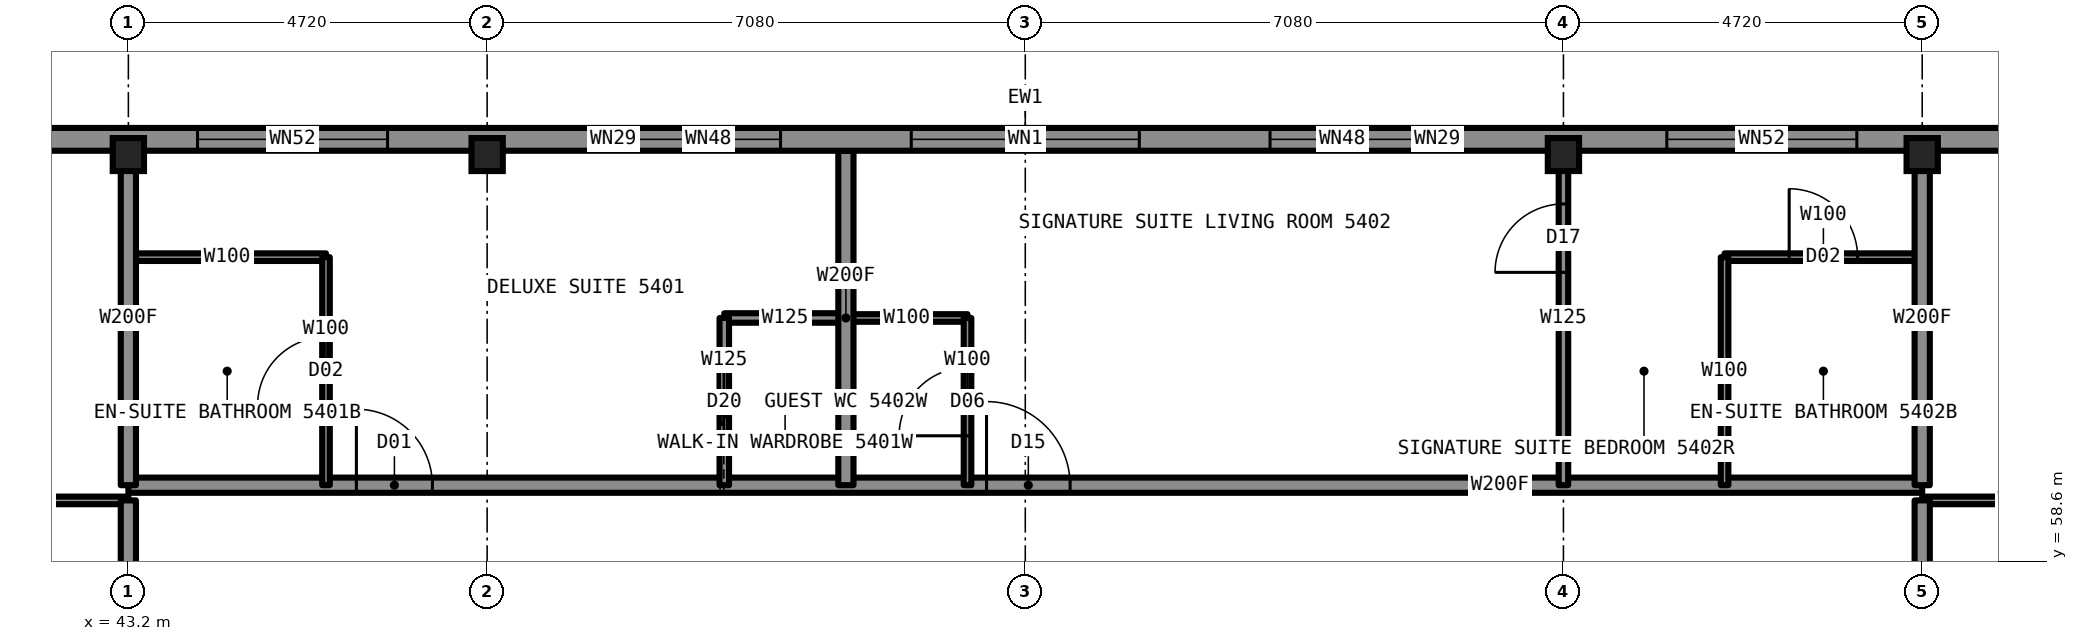
"""IFC4 building model, lengths in metres.
Left out: names, types, materials, properties, quantities, classifications, styles, units other than length and angle.
Written with IfcOpenShell. Run it as: python <this file> out.ifc"""

import sys

from ifc_helpers import new_model, si_unit, direction, frame, frame_2d, origin, origin_2d, place, context, subcontext, project, spatial, rectangle, i_section, extrude, element, fill, save


model = new_model("IFC4")
c1 = context("Model", 3, precision=1e-05, world=origin(), true_north=direction((0.0, 1.0)))
c2 = subcontext(c1, "Body", "Model", "MODEL_VIEW")
j1 = project(units=[si_unit("LENGTHUNIT", "METRE"), si_unit("PLANEANGLEUNIT", "RADIAN")], contexts=[c1])
p1 = place(None, origin())
s1 = spatial("IfcSite", under=j1, at=p1, CompositionType="ELEMENT")
p2 = place(p1, origin())
s2 = spatial("IfcBuilding", under=s1, at=p2, CompositionType="ELEMENT")
p3 = place(p2, frame((0.0, 0.0, 193.3)))
s3 = spatial("IfcBuildingStorey", under=s2, at=p3, CompositionType="ELEMENT", Elevation=193.3)
for number, where, z_axis, x_axis in (
    (1, (43.2, 63.95, 0.0), (0.0, 0.0, 1.0), (1.0, 0.0, 0.0)),
    (2, (47.92, 63.95, 0.0), (0.0, 0.0, 1.0), (1.0, 0.0, 0.0)),
    (3, (62.08, 63.95, 0.0), (0.0, 0.0, 1.0), (1.0, 0.0, 0.0)),
    (4, (66.8, 63.95, 0.0), (0.0, 0.0, 1.0), (1.0, 0.0, 0.0)),
):
    element("IfcColumn", number, at=place(p3, frame(where, z_axis=z_axis, x_axis=x_axis)), inside=s3, PredefinedType="COLUMN", context=c2, shape_type="SweptSolid", body=[
        extrude(i_section(OverallWidth=0.411, OverallDepth=0.434, WebThickness=0.036, FlangeThickness=0.057, at=origin_2d()), origin(), (0.0, 0.0, 1.0), 3.5),
    ])
for number, where, z_axis, x_axis in (
    (5, (40.6, 59.4, 0.0), (0.0, 0.0, 1.0), (1.0, 0.0, 0.0)),
    (6, (66.8, 59.4, 0.0), (0.0, 0.0, 1.0), (1.0, 0.0, 0.0)),
):
    element("IfcWall", number, at=place(p3, frame(where, z_axis=z_axis, x_axis=x_axis)), inside=s3, PredefinedType="PARTITIONING", context=c2, shape_type="SweptSolid", body=[
        extrude(rectangle(XDim=2.6, YDim=0.1, at=frame_2d((1.3, 0.0))), origin(), (0.0, 0.0, 1.0), 3.33),
    ])
p4 = place(p3, frame((43.2, 59.6, 0.0), z_axis=(0.0, 0.0, 1.0), x_axis=(1.0, 0.0, 0.0)))
e7 = element("IfcWall", 7, at=p4, inside=s3, PredefinedType="PARTITIONING", context=c2, shape_type="SweptSolid", body=[
    extrude(rectangle(XDim=23.6, YDim=0.2, at=frame_2d((11.8, 0.0))), origin(), (0.0, 0.0, 1.0), 3.33),
])
p5 = place(p4, frame((3.0, 0.0, 0.0)))
e8 = element("IfcOpeningElement", 8, at=p5, cuts=e7, PredefinedType="OPENING", context=c2, shape_type="SweptSolid", body=[
    extrude(rectangle(XDim=1.0, YDim=2.2, at=frame_2d((0.5, 1.1))), frame((0.0, 0.11, 0.0), z_axis=(0.0, -1.0, 0.0), x_axis=(1.0, 0.0, 0.0)), (0.0, 0.0, 1.0), 0.22),
])
p6 = place(p4, frame((11.29, 0.0, 0.0)))
e9 = element("IfcOpeningElement", 9, at=p6, cuts=e7, PredefinedType="OPENING", context=c2, shape_type="SweptSolid", body=[
    extrude(rectangle(XDim=1.1, YDim=2.2, at=frame_2d((0.55, 1.1))), frame((0.0, 0.11, 0.0), z_axis=(0.0, -1.0, 0.0), x_axis=(1.0, 0.0, 0.0)), (0.0, 0.0, 1.0), 0.22),
])
p7 = place(p3, frame((52.64, 61.8, 0.0), z_axis=(0.0, 0.0, 1.0), x_axis=(1.0, 0.0, 0.0)))
e10 = element("IfcWall", 10, at=p7, inside=s3, PredefinedType="PARTITIONING", context=c2, shape_type="SweptSolid", body=[
    extrude(rectangle(XDim=1.6, YDim=0.1, at=frame_2d((0.8, 0.0))), origin(), (0.0, 0.0, 1.0), 3.33),
])
p8 = place(p3, frame((51.04, 61.8, 0.0), z_axis=(0.0, 0.0, 1.0), x_axis=(1.0, 0.0, 0.0)))
e11 = element("IfcWall", 11, at=p8, inside=s3, PredefinedType="PARTITIONING", context=c2, shape_type="SweptSolid", body=[
    extrude(rectangle(XDim=1.6, YDim=0.125, at=frame_2d((0.8, 0.0))), origin(), (0.0, 0.0, 1.0), 3.33),
])
p9 = place(p3, frame((43.2, 62.6, 0.0), z_axis=(0.0, 0.0, 1.0), x_axis=(1.0, 0.0, 0.0)))
e12 = element("IfcWall", 12, at=p9, inside=s3, PredefinedType="PARTITIONING", context=c2, shape_type="SweptSolid", body=[
    extrude(rectangle(XDim=2.6, YDim=0.1, at=frame_2d((1.3, 0.0))), origin(), (0.0, 0.0, 1.0), 3.33),
])
p10 = place(p3, frame((64.2, 62.6, 0.0), z_axis=(0.0, 0.0, 1.0), x_axis=(1.0, 0.0, 0.0)))
e13 = element("IfcWall", 13, at=p10, inside=s3, PredefinedType="PARTITIONING", context=c2, shape_type="SweptSolid", body=[
    extrude(rectangle(XDim=2.6, YDim=0.1, at=frame_2d((1.3, 0.0))), origin(), (0.0, 0.0, 1.0), 3.33),
])
p11 = place(p10, frame((0.85, 0.0, 0.0)))
e14 = element("IfcOpeningElement", 14, at=p11, cuts=e13, PredefinedType="OPENING", context=c2, shape_type="SweptSolid", body=[
    extrude(rectangle(XDim=0.9, YDim=2.1, at=frame_2d((0.45, 1.05))), frame((0.0, 0.06, 0.0), z_axis=(0.0, -1.0, 0.0), x_axis=(1.0, 0.0, 0.0)), (0.0, 0.0, 1.0), 0.12),
])
p12 = place(p3, frame((54.24, 59.6, 0.0), z_axis=(0.0, 0.0, 1.0), x_axis=(0.0, 1.0, 0.0)))
e15 = element("IfcWall", 15, at=p12, inside=s3, PredefinedType="PARTITIONING", context=c2, shape_type="SweptSolid", body=[
    extrude(rectangle(XDim=2.2, YDim=0.1, at=frame_2d((1.1, 0.0))), origin(), (0.0, 0.0, 1.0), 3.33),
])
p13 = place(p12, frame((0.65, 0.0, 0.0)))
e16 = element("IfcOpeningElement", 16, at=p13, cuts=e15, PredefinedType="OPENING", context=c2, shape_type="SweptSolid", body=[
    extrude(rectangle(XDim=0.9, YDim=2.1, at=frame_2d((0.45, 1.05))), frame((0.0, 0.06, 0.0), z_axis=(0.0, -1.0, 0.0), x_axis=(1.0, 0.0, 0.0)), (0.0, 0.0, 1.0), 0.12),
])
p14 = place(p3, frame((43.2, 59.6, 0.0), z_axis=(0.0, 0.0, 1.0), x_axis=(0.0, 1.0, 0.0)))
e17 = element("IfcWall", 17, at=p14, inside=s3, PredefinedType="PARTITIONING", context=c2, shape_type="SweptSolid", body=[
    extrude(rectangle(XDim=4.4, YDim=0.2, at=frame_2d((2.2, 0.0))), origin(), (0.0, 0.0, 1.0), 2.573),
])
p15 = place(p3, frame((52.64, 59.6, 0.0), z_axis=(0.0, 0.0, 1.0), x_axis=(0.0, 1.0, 0.0)))
e18 = element("IfcWall", 18, at=p15, inside=s3, PredefinedType="PARTITIONING", context=c2, shape_type="SweptSolid", body=[
    extrude(rectangle(XDim=4.4, YDim=0.2, at=frame_2d((2.2, 0.0))), origin(), (0.0, 0.0, 1.0), 3.33),
])
p16 = place(p3, frame((51.04, 59.6, 0.0), z_axis=(0.0, 0.0, 1.0), x_axis=(0.0, 1.0, 0.0)))
e19 = element("IfcWall", 19, at=p16, inside=s3, PredefinedType="PARTITIONING", context=c2, shape_type="SweptSolid", body=[
    extrude(rectangle(XDim=2.2, YDim=0.125, at=frame_2d((1.1, 0.0))), origin(), (0.0, 0.0, 1.0), 3.33),
])
p17 = place(p16, frame((0.7, 0.0, 0.0)))
e20 = element("IfcOpeningElement", 20, at=p17, cuts=e19, PredefinedType="OPENING", context=c2, shape_type="SweptSolid", body=[
    extrude(rectangle(XDim=0.8, YDim=2.1, at=frame_2d((0.4, 1.05))), frame((0.0, 0.073, 0.0), z_axis=(0.0, -1.0, 0.0), x_axis=(1.0, 0.0, 0.0)), (0.0, 0.0, 1.0), 0.145),
])
p18 = place(p3, frame((45.8, 59.6, 0.0), z_axis=(0.0, 0.0, 1.0), x_axis=(0.0, 1.0, 0.0)))
e21 = element("IfcWall", 21, at=p18, inside=s3, PredefinedType="PARTITIONING", context=c2, shape_type="SweptSolid", body=[
    extrude(rectangle(XDim=3.0, YDim=0.1, at=frame_2d((1.5, 0.0))), origin(), (0.0, 0.0, 1.0), 3.33),
])
p19 = place(p18, frame((1.05, 0.0, 0.0)))
e22 = element("IfcOpeningElement", 22, at=p19, cuts=e21, PredefinedType="OPENING", context=c2, shape_type="SweptSolid", body=[
    extrude(rectangle(XDim=0.9, YDim=2.1, at=frame_2d((0.45, 1.05))), frame((0.0, 0.06, 0.0), z_axis=(0.0, -1.0, 0.0), x_axis=(1.0, 0.0, 0.0)), (0.0, 0.0, 1.0), 0.12),
])
p20 = place(p3, frame((66.8, 59.6, 0.0), z_axis=(0.0, 0.0, 1.0), x_axis=(0.0, 1.0, 0.0)))
e23 = element("IfcWall", 23, at=p20, inside=s3, PredefinedType="PARTITIONING", context=c2, shape_type="SweptSolid", body=[
    extrude(rectangle(XDim=4.4, YDim=0.2, at=frame_2d((2.2, 0.0))), origin(), (0.0, 0.0, 1.0), 2.573),
])
p21 = place(p3, frame((62.08, 59.6, 0.0), z_axis=(0.0, 0.0, 1.0), x_axis=(0.0, 1.0, 0.0)))
e24 = element("IfcWall", 24, at=p21, inside=s3, PredefinedType="PARTITIONING", context=c2, shape_type="SweptSolid", body=[
    extrude(rectangle(XDim=4.4, YDim=0.125, at=frame_2d((2.2, 0.0))), origin(), (0.0, 0.0, 1.0), 2.573),
])
p22 = place(p21, frame((2.8, 0.0, 0.0)))
e25 = element("IfcOpeningElement", 25, at=p22, cuts=e24, PredefinedType="OPENING", context=c2, shape_type="SweptSolid", body=[
    extrude(rectangle(XDim=0.9, YDim=2.2, at=frame_2d((0.45, 1.1))), frame((0.0, 0.073, 0.0), z_axis=(0.0, -1.0, 0.0), x_axis=(1.0, 0.0, 0.0)), (0.0, 0.0, 1.0), 0.145),
])
p23 = place(p3, frame((64.2, 59.6, 0.0), z_axis=(0.0, 0.0, 1.0), x_axis=(0.0, 1.0, 0.0)))
e26 = element("IfcWall", 26, at=p23, inside=s3, PredefinedType="PARTITIONING", context=c2, shape_type="SweptSolid", body=[
    extrude(rectangle(XDim=3.0, YDim=0.1, at=frame_2d((1.5, 0.0))), origin(), (0.0, 0.0, 1.0), 3.33),
])
p24 = place(p3, frame((68.8, 64.15, 0.0), z_axis=(0.0, 0.0, 1.0), x_axis=(-1.0, 0.0, 0.0)))
e27 = element("IfcWall", 27, at=p24, inside=s3, PredefinedType="SOLIDWALL", context=c2, shape_type="SweptSolid", body=[
    extrude(rectangle(XDim=27.6, YDim=0.3, at=frame_2d((13.8, 0.0))), origin(), (0.0, 0.0, 1.0), 2.83),
])
p25 = place(p24, frame((2.86, 0.0, 0.3)))
e28 = element("IfcOpeningElement", 28, at=p25, cuts=e27, PredefinedType="OPENING", context=c2, shape_type="SweptSolid", body=[
    extrude(rectangle(XDim=3.0, YDim=2.0, at=frame_2d((1.5, 1.0))), frame((0.0, 0.16, 0.0), z_axis=(0.0, -1.0, 0.0), x_axis=(1.0, 0.0, 0.0)), (0.0, 0.0, 1.0), 0.32),
])
p26 = place(p24, frame((7.58, 0.0, 0.3)))
e29 = element("IfcOpeningElement", 29, at=p26, cuts=e27, PredefinedType="OPENING", context=c2, shape_type="SweptSolid", body=[
    extrude(rectangle(XDim=2.5, YDim=2.0, at=frame_2d((1.25, 1.0))), frame((0.0, 0.16, 0.0), z_axis=(0.0, -1.0, 0.0), x_axis=(1.0, 0.0, 0.0)), (0.0, 0.0, 1.0), 0.32),
])
p27 = place(p24, frame((12.95, 0.0, 1.0)))
e30 = element("IfcOpeningElement", 30, at=p27, cuts=e27, PredefinedType="OPENING", context=c2, shape_type="SweptSolid", body=[
    extrude(rectangle(XDim=1.7, YDim=1.3, at=frame_2d((0.85, 0.65))), frame((0.0, 0.16, 0.0), z_axis=(0.0, -1.0, 0.0), x_axis=(1.0, 0.0, 0.0)), (0.0, 0.0, 1.0), 0.32),
])
p28 = place(p24, frame((17.52, 0.0, 0.3)))
e31 = element("IfcOpeningElement", 31, at=p28, cuts=e27, PredefinedType="OPENING", context=c2, shape_type="SweptSolid", body=[
    extrude(rectangle(XDim=2.5, YDim=2.0, at=frame_2d((1.25, 1.0))), frame((0.0, 0.16, 0.0), z_axis=(0.0, -1.0, 0.0), x_axis=(1.0, 0.0, 0.0)), (0.0, 0.0, 1.0), 0.32),
])
p29 = place(p24, frame((21.74, 0.0, 0.3)))
e32 = element("IfcOpeningElement", 32, at=p29, cuts=e27, PredefinedType="OPENING", context=c2, shape_type="SweptSolid", body=[
    extrude(rectangle(XDim=3.0, YDim=2.0, at=frame_2d((1.5, 1.0))), frame((0.0, 0.16, 0.0), z_axis=(0.0, -1.0, 0.0), x_axis=(1.0, 0.0, 0.0)), (0.0, 0.0, 1.0), 0.32),
])
for number, where, z_axis, x_axis in (
    (33, (43.2, 56.78, 0.0), (0.0, 0.0, 1.0), (0.0, 1.0, 0.0)),
    (34, (66.8, 56.78, 0.0), (0.0, 0.0, 1.0), (0.0, 1.0, 0.0)),
):
    element("IfcWall", number, at=place(p3, frame(where, z_axis=z_axis, x_axis=x_axis)), inside=s3, PredefinedType="PARTITIONING", context=c2, shape_type="SweptSolid", body=[
        extrude(rectangle(XDim=2.62, YDim=0.2, at=frame_2d((1.31, 0.0))), origin(), (0.0, 0.0, 1.0), 2.573),
    ])
p30 = place(p5, origin())
e35 = element("IfcDoor", 35, at=p30, inside=s3, OperationType="SINGLE_SWING_LEFT", PredefinedType="DOOR", context=c2, shape_type="SweptSolid", body=[
    extrude(rectangle(XDim=1.0, YDim=2.2, at=frame_2d((0.5, 1.1))), frame((0.0, 0.025, 0.0), z_axis=(0.0, -1.0, 0.0), x_axis=(1.0, 0.0, 0.0)), (0.0, 0.0, 1.0), 0.05),
])
fill(e8, e35)
p31 = place(p19, origin())
e36 = element("IfcDoor", 36, at=p31, inside=s3, OperationType="SINGLE_SWING_RIGHT", PredefinedType="DOOR", context=c2, shape_type="SweptSolid", body=[
    extrude(rectangle(XDim=0.9, YDim=2.1, at=frame_2d((0.45, 1.05))), frame((0.0, 0.025, 0.0), z_axis=(0.0, -1.0, 0.0), x_axis=(1.0, 0.0, 0.0)), (0.0, 0.0, 1.0), 0.05),
])
fill(e22, e36)
p32 = place(p17, origin())
e37 = element("IfcDoor", 37, at=p32, inside=s3, OperationType="SLIDING_TO_LEFT", PredefinedType="DOOR", context=c2, shape_type="SweptSolid", body=[
    extrude(rectangle(XDim=0.8, YDim=2.1, at=frame_2d((0.4, 1.05))), frame((0.0, 0.025, 0.0), z_axis=(0.0, -1.0, 0.0), x_axis=(1.0, 0.0, 0.0)), (0.0, 0.0, 1.0), 0.05),
])
fill(e20, e37)
p33 = place(p6, origin())
e38 = element("IfcDoor", 38, at=p33, inside=s3, OperationType="SINGLE_SWING_LEFT", PredefinedType="DOOR", context=c2, shape_type="SweptSolid", body=[
    extrude(rectangle(XDim=1.1, YDim=2.2, at=frame_2d((0.55, 1.1))), frame((0.0, 0.025, 0.0), z_axis=(0.0, -1.0, 0.0), x_axis=(1.0, 0.0, 0.0)), (0.0, 0.0, 1.0), 0.05),
])
fill(e9, e38)
p34 = place(p11, origin())
e39 = element("IfcDoor", 39, at=p34, inside=s3, OperationType="SINGLE_SWING_RIGHT", PredefinedType="DOOR", context=c2, shape_type="SweptSolid", body=[
    extrude(rectangle(XDim=0.9, YDim=2.1, at=frame_2d((0.45, 1.05))), frame((0.0, 0.025, 0.0), z_axis=(0.0, -1.0, 0.0), x_axis=(1.0, 0.0, 0.0)), (0.0, 0.0, 1.0), 0.05),
])
fill(e14, e39)
p35 = place(p22, origin())
e40 = element("IfcDoor", 40, at=p35, inside=s3, OperationType="SINGLE_SWING_LEFT", PredefinedType="DOOR", context=c2, shape_type="SweptSolid", body=[
    extrude(rectangle(XDim=0.9, YDim=2.2, at=frame_2d((0.45, 1.1))), frame((0.0, 0.025, 0.0), z_axis=(0.0, -1.0, 0.0), x_axis=(1.0, 0.0, 0.0)), (0.0, 0.0, 1.0), 0.05),
])
fill(e25, e40)
p36 = place(p13, origin())
e41 = element("IfcDoor", 41, at=p36, inside=s3, OperationType="SINGLE_SWING_LEFT", PredefinedType="DOOR", context=c2, shape_type="SweptSolid", body=[
    extrude(rectangle(XDim=0.9, YDim=2.1, at=frame_2d((0.45, 1.05))), frame((0.0, 0.025, 0.0), z_axis=(0.0, -1.0, 0.0), x_axis=(1.0, 0.0, 0.0)), (0.0, 0.0, 1.0), 0.05),
])
fill(e16, e41)
p37 = place(p25, origin())
e42 = element("IfcWindow", 42, at=p37, inside=s3, PartitioningType="SINGLE_PANEL", PredefinedType="WINDOW", context=c2, shape_type="SweptSolid", body=[
    extrude(rectangle(XDim=3.0, YDim=2.0, at=frame_2d((1.5, 1.0))), frame((0.0, 0.13, 0.0), z_axis=(0.0, -1.0, 0.0), x_axis=(1.0, 0.0, 0.0)), (0.0, 0.0, 1.0), 0.06),
])
fill(e28, e42)
p38 = place(p26, origin())
e43 = element("IfcWindow", 43, at=p38, inside=s3, PartitioningType="SINGLE_PANEL", PredefinedType="WINDOW", context=c2, shape_type="SweptSolid", body=[
    extrude(rectangle(XDim=2.5, YDim=2.0, at=frame_2d((1.25, 1.0))), frame((0.0, 0.13, 0.0), z_axis=(0.0, -1.0, 0.0), x_axis=(1.0, 0.0, 0.0)), (0.0, 0.0, 1.0), 0.06),
])
fill(e29, e43)
p39 = place(p27, origin())
e44 = element("IfcWindow", 44, at=p39, inside=s3, PartitioningType="SINGLE_PANEL", PredefinedType="WINDOW", context=c2, shape_type="SweptSolid", body=[
    extrude(rectangle(XDim=1.7, YDim=1.3, at=frame_2d((0.85, 0.65))), frame((0.0, 0.13, 0.0), z_axis=(0.0, -1.0, 0.0), x_axis=(1.0, 0.0, 0.0)), (0.0, 0.0, 1.0), 0.06),
])
fill(e30, e44)
p40 = place(p28, origin())
e45 = element("IfcWindow", 45, at=p40, inside=s3, PartitioningType="SINGLE_PANEL", PredefinedType="WINDOW", context=c2, shape_type="SweptSolid", body=[
    extrude(rectangle(XDim=2.5, YDim=2.0, at=frame_2d((1.25, 1.0))), frame((0.0, 0.13, 0.0), z_axis=(0.0, -1.0, 0.0), x_axis=(1.0, 0.0, 0.0)), (0.0, 0.0, 1.0), 0.06),
])
fill(e31, e45)
p41 = place(p29, origin())
e46 = element("IfcWindow", 46, at=p41, inside=s3, PartitioningType="SINGLE_PANEL", PredefinedType="WINDOW", context=c2, shape_type="SweptSolid", body=[
    extrude(rectangle(XDim=3.0, YDim=2.0, at=frame_2d((1.5, 1.0))), frame((0.0, 0.13, 0.0), z_axis=(0.0, -1.0, 0.0), x_axis=(1.0, 0.0, 0.0)), (0.0, 0.0, 1.0), 0.06),
])
fill(e32, e46)
save(model, sys.argv[1])
